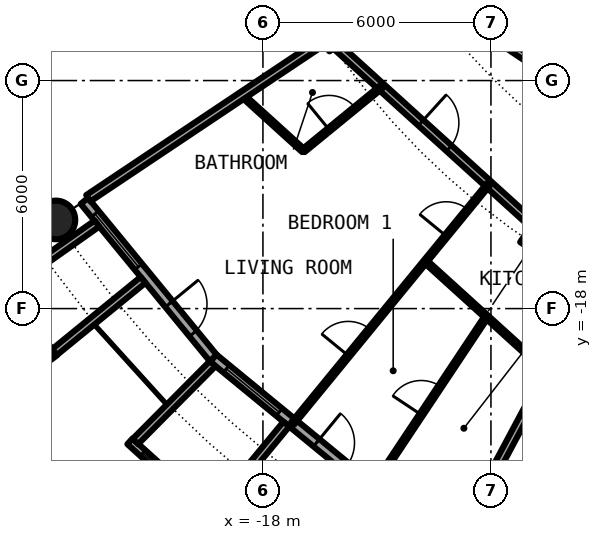
"""IFC4 building model, lengths in metres.
Left out: names, types, materials, properties, quantities, classifications, styles, units other than length and angle.
Written with IfcOpenShell. Run it as: python <this file> out.ifc"""

import sys

from ifc_helpers import new_model, si_unit, direction, frame, frame_2d, origin, origin_2d, place, context, subcontext, project, spatial, rectangle, circle, hollow_circle, i_section, extrude, element, fill, save


model = new_model("IFC4")
c1 = context("Model", 3, precision=1e-05, world=origin(), true_north=direction((0.0, 1.0)))
c2 = subcontext(c1, "Body", "Model", "MODEL_VIEW")
j1 = project(units=[si_unit("LENGTHUNIT", "METRE"), si_unit("PLANEANGLEUNIT", "RADIAN")], contexts=[c1])
p1 = place(None, origin())
s1 = spatial("IfcSite", under=j1, at=p1, CompositionType="ELEMENT")
p2 = place(p1, origin())
s2 = spatial("IfcBuilding", under=s1, at=p2, CompositionType="ELEMENT")
p3 = place(p2, frame((0.0, 0.0, 28.9)))
s3 = spatial("IfcBuildingStorey", under=s2, at=p3, CompositionType="ELEMENT", Elevation=28.9)
p4 = place(p3, frame((-23.448, -15.667, 0.0), z_axis=(0.0, 0.0, 1.0), x_axis=(1.0, 0.0, 0.0)))
e1 = element("IfcColumn", 1, at=p4, inside=s3, PredefinedType="COLUMN", context=c2, shape_type="SweptSolid", body=[
    extrude(hollow_circle(Radius=0.508, WallThickness=0.05, at=origin_2d()), origin(), (0.0, 0.0, 1.0), 3.05),
])
p5 = place(p3, frame((-10.889, -16.297, 0.0), z_axis=(0.0, 0.0, 1.0), x_axis=(-0.55557023302, -0.831469612303, 0.0)))
e2 = element("IfcColumn", 2, at=p5, inside=s3, PredefinedType="COLUMN", context=c2, shape_type="SweptSolid", body=[
    extrude(i_section(OverallWidth=0.305, OverallDepth=0.62, WebThickness=0.021, FlangeThickness=0.04, FilletRadius=0.027, at=origin_2d()), origin(), (0.0, 0.0, 1.0), 3.05),
])
p6 = place(p3, frame((-22.699, -15.167, 0.0), z_axis=(0.0, 0.0, 1.0), x_axis=(0.634382322723, -0.773019449054, 0.0)))
e3 = element("IfcWall", 3, at=p6, inside=s3, PredefinedType="SOLIDWALL", context=c2, shape_type="SweptSolid", body=[
    extrude(rectangle(XDim=5.352, YDim=0.25, at=frame_2d((2.676, 0.0))), origin(), (0.0, 0.0, 1.0), 2.7),
])
p7 = place(p6, frame((0.441, 0.0, 0.3)))
e4 = element("IfcOpeningElement", 4, at=p7, cuts=e3, PredefinedType="OPENING", context=c2, shape_type="SweptSolid", body=[
    extrude(rectangle(XDim=1.8, YDim=2.1, at=frame_2d((0.9, 1.05))), frame((0.0, 0.135, 0.0), z_axis=(0.0, -1.0, 0.0), x_axis=(1.0, 0.0, 0.0)), (0.0, 0.0, 1.0), 0.27),
])
p8 = place(p6, frame((3.51, 0.0, 0.0)))
e5 = element("IfcOpeningElement", 5, at=p8, cuts=e3, PredefinedType="OPENING", context=c2, shape_type="SweptSolid", body=[
    extrude(rectangle(XDim=1.0, YDim=2.2, at=frame_2d((0.5, 1.1))), frame((0.0, 0.135, 0.0), z_axis=(0.0, -1.0, 0.0), x_axis=(1.0, 0.0, 0.0)), (0.0, 0.0, 1.0), 0.27),
])
p9 = place(p3, frame((-24.909, -17.427, -0.03), z_axis=(0.0, 0.0, 1.0), x_axis=(0.60418752353, -0.796842165306, 0.0)))
e6 = element("IfcWall", 6, at=p9, inside=s3, PredefinedType="SOLIDWALL", context=c2, shape_type="SweptSolid", body=[
    extrude(rectangle(XDim=2.337, YDim=0.2, at=frame_2d((1.168, 0.0))), origin(), (0.0, 0.0, 1.0), 2.73),
])
p10 = place(p9, frame((0.128, 0.0, 0.33)))
e7 = element("IfcOpeningElement", 7, at=p10, cuts=e6, PredefinedType="OPENING", context=c2, shape_type="SweptSolid", body=[
    extrude(circle(Radius=1.04, at=frame_2d((1.04, 1.04))), frame((0.0, 0.11, 0.0), z_axis=(0.0, -1.0, 0.0), x_axis=(1.0, 0.0, 0.0)), (0.0, 0.0, 1.0), 0.22),
])
p11 = place(p3, frame((-22.37, -15.765, -0.03), z_axis=(0.0, 0.0, 1.0), x_axis=(-0.817256123454, -0.576274612209, 0.0)))
e8 = element("IfcWall", 8, at=p11, inside=s3, PredefinedType="SOLIDWALL", context=c2, shape_type="SweptSolid", body=[
    extrude(rectangle(XDim=2.933, YDim=0.2, at=frame_2d((1.466, 0.0))), origin(), (0.0, 0.0, 1.0), 2.73),
])
p12 = place(p3, frame((-21.155, -17.246, -0.03), z_axis=(0.0, 0.0, 1.0), x_axis=(-0.775179004516, -0.631741648902, 0.0)))
e9 = element("IfcWall", 9, at=p12, inside=s3, PredefinedType="SOLIDWALL", context=c2, shape_type="SweptSolid", body=[
    extrude(rectangle(XDim=3.006, YDim=0.2, at=frame_2d((1.503, 0.0))), origin(), (0.0, 0.0, 1.0), 2.73),
])
p13 = place(p3, frame((-19.304, -19.304, 0.0), z_axis=(0.0, 0.0, 1.0), x_axis=(0.773019449054, -0.634382322723, 0.0)))
e10 = element("IfcWall", 10, at=p13, inside=s3, PredefinedType="SOLIDWALL", context=c2, shape_type="SweptSolid", body=[
    extrude(rectangle(XDim=5.352, YDim=0.25, at=frame_2d((2.676, 0.0))), origin(), (0.0, 0.0, 1.0), 2.7),
])
p14 = place(p13, frame((0.441, 0.0, 0.3)))
e11 = element("IfcOpeningElement", 11, at=p14, cuts=e10, PredefinedType="OPENING", context=c2, shape_type="SweptSolid", body=[
    extrude(rectangle(XDim=1.8, YDim=2.1, at=frame_2d((0.9, 1.05))), frame((0.0, 0.135, 0.0), z_axis=(0.0, -1.0, 0.0), x_axis=(1.0, 0.0, 0.0)), (0.0, 0.0, 1.0), 0.27),
])
p15 = place(p13, frame((3.51, 0.0, 0.0)))
e12 = element("IfcOpeningElement", 12, at=p15, cuts=e10, PredefinedType="OPENING", context=c2, shape_type="SweptSolid", body=[
    extrude(rectangle(XDim=1.0, YDim=2.2, at=frame_2d((0.5, 1.1))), frame((0.0, 0.135, 0.0), z_axis=(0.0, -1.0, 0.0), x_axis=(1.0, 0.0, 0.0)), (0.0, 0.0, 1.0), 0.27),
])
p16 = place(p3, frame((-21.5, -21.493, -0.03), z_axis=(0.0, 0.0, 1.0), x_axis=(0.740998365753, -0.671506829416, 0.0)))
e13 = element("IfcWall", 13, at=p16, inside=s3, PredefinedType="SOLIDWALL", context=c2, shape_type="SweptSolid", body=[
    extrude(rectangle(XDim=2.993, YDim=0.2, at=frame_2d((1.497, 0.0))), origin(), (0.0, 0.0, 1.0), 2.73),
])
p17 = place(p16, frame((0.457, 0.0, 0.33)))
e14 = element("IfcOpeningElement", 14, at=p17, cuts=e13, PredefinedType="OPENING", context=c2, shape_type="SweptSolid", body=[
    extrude(circle(Radius=1.04, at=frame_2d((1.04, 1.04))), frame((0.0, 0.11, 0.0), z_axis=(0.0, -1.0, 0.0), x_axis=(1.0, 0.0, 0.0)), (0.0, 0.0, 1.0), 0.22),
])
p18 = place(p3, frame((-19.323, -19.45, -0.03), z_axis=(0.0, 0.0, 1.0), x_axis=(-0.704476739375, -0.709727076896, 0.0)))
e15 = element("IfcWall", 15, at=p18, inside=s3, PredefinedType="SOLIDWALL", context=c2, shape_type="SweptSolid", body=[
    extrude(rectangle(XDim=2.883, YDim=0.2, at=frame_2d((1.441, 0.0))), origin(), (0.0, 0.0, 1.0), 2.73),
])
p19 = place(p3, frame((-17.384, -21.041, -0.03), z_axis=(0.0, 0.0, 1.0), x_axis=(-0.63709551667, -0.770784861449, 0.0)))
e16 = element("IfcWall", 16, at=p19, inside=s3, PredefinedType="SOLIDWALL", context=c2, shape_type="SweptSolid", body=[
    extrude(rectangle(XDim=3.006, YDim=0.2, at=frame_2d((1.503, 0.0))), origin(), (0.0, 0.0, 1.0), 2.73),
])
p20 = place(p3, frame((-18.542, -12.389, 0.0), z_axis=(0.0, 0.0, 1.0), x_axis=(0.740836325503, -0.671685595212, 0.0)))
e17 = element("IfcWall", 17, at=p20, inside=s3, PredefinedType="PARTITIONING", context=c2, shape_type="SweptSolid", body=[
    extrude(rectangle(XDim=2.168, YDim=0.1, at=frame_2d((1.084, 0.0))), origin(), (0.0, 0.0, 1.0), 2.7),
])
p21 = place(p3, frame((-13.727, -16.754, 0.0), z_axis=(0.0, 0.0, 1.0), x_axis=(0.740840803797, -0.671680655839, 0.0)))
e18 = element("IfcWall", 18, at=p21, inside=s3, PredefinedType="PARTITIONING", context=c2, shape_type="SweptSolid", body=[
    extrude(rectangle(XDim=4.338, YDim=0.1, at=frame_2d((2.169, 0.0))), origin(), (0.0, 0.0, 1.0), 2.7),
])
p22 = place(p3, frame((-16.18, -10.994, 0.0), z_axis=(0.0, 0.0, 1.0), x_axis=(0.74089212117, -0.671624050186, 0.0)))
e19 = element("IfcWall", 19, at=p22, inside=s3, PredefinedType="PARTITIONING", context=c2, shape_type="SweptSolid", body=[
    extrude(rectangle(XDim=9.368, YDim=0.2, at=frame_2d((4.684, 0.0))), origin(), (0.0, 0.0, 1.0), 2.38),
])
p23 = place(p22, frame((3.153, 0.0, 0.0)))
e20 = element("IfcOpeningElement", 20, at=p23, cuts=e19, PredefinedType="OPENING", context=c2, shape_type="SweptSolid", body=[
    extrude(rectangle(XDim=1.0, YDim=2.3, at=frame_2d((0.5, 1.15))), frame((0.0, 0.11, 0.0), z_axis=(0.0, -1.0, 0.0), x_axis=(1.0, 0.0, 0.0)), (0.0, 0.0, 1.0), 0.22),
])
p24 = place(p3, frame((-14.036, -9.402, 0.0), z_axis=(0.0, 0.0, 1.0), x_axis=(0.831561346449, -0.555432918625, 0.0)))
e21 = element("IfcWall", 21, at=p24, inside=s3, PredefinedType="PARTITIONING", context=c2, shape_type="SweptSolid", body=[
    extrude(rectangle(XDim=12.914, YDim=0.2, at=frame_2d((6.457, 0.0))), origin(), (0.0, 0.0, 1.0), 2.7),
])
p25 = place(p24, frame((7.566, 0.0, 0.0)))
e22 = element("IfcOpeningElement", 22, at=p25, cuts=e21, PredefinedType="OPENING", context=c2, shape_type="SweptSolid", body=[
    extrude(rectangle(XDim=1.0, YDim=2.3, at=frame_2d((0.5, 1.15))), frame((0.0, 0.11, 0.0), z_axis=(0.0, -1.0, 0.0), x_axis=(1.0, 0.0, 0.0)), (0.0, 0.0, 1.0), 0.22),
])
p26 = place(p3, frame((-22.595, -15.097, 0.0), z_axis=(0.0, 0.0, 1.0), x_axis=(0.831465568067, 0.555576285599, 0.0)))
e23 = element("IfcWall", 23, at=p26, inside=s3, PredefinedType="PARTITIONING", context=c2, shape_type="SweptSolid", body=[
    extrude(rectangle(XDim=7.264, YDim=0.2, at=frame_2d((3.632, 0.0))), origin(), (0.0, 0.0, 1.0), 2.7),
])
p27 = place(p3, frame((-17.219, -21.023, 0.0), z_axis=(0.0, 0.0, 1.0), x_axis=(0.633664062855, 0.773608334654, 0.0)))
e24 = element("IfcWall", 24, at=p27, inside=s3, PredefinedType="PARTITIONING", context=c2, shape_type="SweptSolid", body=[
    extrude(rectangle(XDim=8.138, YDim=0.1, at=frame_2d((4.069, 0.0))), origin(), (0.0, 0.0, 1.0), 2.7),
])
p28 = place(p27, frame((6.377, 0.0, 0.0)))
e25 = element("IfcOpeningElement", 25, at=p28, cuts=e24, PredefinedType="OPENING", context=c2, shape_type="SweptSolid", body=[
    extrude(rectangle(XDim=0.9, YDim=2.3, at=frame_2d((0.45, 1.15))), frame((0.0, 0.06, 0.0), z_axis=(0.0, -1.0, 0.0), x_axis=(1.0, 0.0, 0.0)), (0.0, 0.0, 1.0), 0.12),
])
p29 = place(p27, frame((2.308, 0.0, 0.0)))
e26 = element("IfcOpeningElement", 26, at=p29, cuts=e24, PredefinedType="OPENING", context=c2, shape_type="SweptSolid", body=[
    extrude(rectangle(XDim=0.9, YDim=2.3, at=frame_2d((0.45, 1.15))), frame((0.0, 0.06, 0.0), z_axis=(0.0, -1.0, 0.0), x_axis=(1.0, 0.0, 0.0)), (0.0, 0.0, 1.0), 0.12),
])
p30 = place(p3, frame((-16.936, -13.845, 0.0), z_axis=(0.0, 0.0, 1.0), x_axis=(0.774162545943, 0.632986850147, 0.0)))
e27 = element("IfcWall", 27, at=p30, inside=s3, PredefinedType="PARTITIONING", context=c2, shape_type="SweptSolid", body=[
    extrude(rectangle(XDim=2.649, YDim=0.1, at=frame_2d((1.325, 0.0))), origin(), (0.0, 0.0, 1.0), 2.7),
])
p31 = place(p30, frame((0.875, 0.0, 0.0)))
e28 = element("IfcOpeningElement", 28, at=p31, cuts=e27, PredefinedType="OPENING", context=c2, shape_type="SweptSolid", body=[
    extrude(rectangle(XDim=0.9, YDim=2.3, at=frame_2d((0.45, 1.15))), frame((0.0, 0.06, 0.0), z_axis=(0.0, -1.0, 0.0), x_axis=(1.0, 0.0, 0.0)), (0.0, 0.0, 1.0), 0.12),
])
p32 = place(p3, frame((-15.054, -22.624, 0.0), z_axis=(0.0, 0.0, 1.0), x_axis=(0.553913391217, 0.832574294, 0.0)))
e29 = element("IfcWall", 29, at=p32, inside=s3, PredefinedType="PARTITIONING", context=c2, shape_type="SweptSolid", body=[
    extrude(rectangle(XDim=5.301, YDim=0.1, at=frame_2d((2.65, 0.0))), origin(), (0.0, 0.0, 1.0), 2.7),
])
p33 = place(p32, frame((2.2, 0.0, 0.0)))
e30 = element("IfcOpeningElement", 30, at=p33, cuts=e29, PredefinedType="OPENING", context=c2, shape_type="SweptSolid", body=[
    extrude(rectangle(XDim=0.9, YDim=2.3, at=frame_2d((0.45, 1.15))), frame((0.0, 0.06, 0.0), z_axis=(0.0, -1.0, 0.0), x_axis=(1.0, 0.0, 0.0)), (0.0, 0.0, 1.0), 0.12),
])
p34 = place(p3, frame((-12.805, -23.968, 0.0), z_axis=(0.0, 0.0, 1.0), x_axis=(0.471173668908, 0.882040460369, 0.0)))
e31 = element("IfcWall", 31, at=p34, inside=s3, PredefinedType="PARTITIONING", context=c2, shape_type="SweptSolid", body=[
    extrude(rectangle(XDim=7.574, YDim=0.2, at=frame_2d((3.787, 0.0))), origin(), (0.0, 0.0, 1.0), 2.7),
])
p35 = place(p7, origin())
e32 = element("IfcWindow", 32, at=p35, inside=s3, PartitioningType="SINGLE_PANEL", PredefinedType="WINDOW", context=c2, shape_type="SweptSolid", body=[
    extrude(rectangle(XDim=1.8, YDim=2.1, at=frame_2d((0.9, 1.05))), frame((0.0, 0.03, 0.0), z_axis=(0.0, -1.0, 0.0), x_axis=(1.0, 0.0, 0.0)), (0.0, 0.0, 1.0), 0.06),
])
fill(e4, e32)
p36 = place(p8, origin())
e33 = element("IfcDoor", 33, at=p36, inside=s3, OperationType="SINGLE_SWING_LEFT", PredefinedType="DOOR", context=c2, shape_type="SweptSolid", body=[
    extrude(rectangle(XDim=1.0, YDim=2.2, at=frame_2d((0.5, 1.1))), frame((0.0, 0.025, 0.0), z_axis=(0.0, -1.0, 0.0), x_axis=(1.0, 0.0, 0.0)), (0.0, 0.0, 1.0), 0.05),
])
fill(e5, e33)
p37 = place(p14, origin())
e34 = element("IfcWindow", 34, at=p37, inside=s3, PartitioningType="SINGLE_PANEL", PredefinedType="WINDOW", context=c2, shape_type="SweptSolid", body=[
    extrude(rectangle(XDim=1.8, YDim=2.1, at=frame_2d((0.9, 1.05))), frame((0.0, 0.03, 0.0), z_axis=(0.0, -1.0, 0.0), x_axis=(1.0, 0.0, 0.0)), (0.0, 0.0, 1.0), 0.06),
])
fill(e11, e34)
p38 = place(p17, origin())
e35 = element("IfcWindow", 35, at=p38, inside=s3, PartitioningType="SINGLE_PANEL", PredefinedType="WINDOW", context=c2, shape_type="SweptSolid", body=[
    extrude(circle(Radius=1.04, at=frame_2d((1.04, 1.04))), frame((0.0, 0.03, 0.0), z_axis=(0.0, -1.0, 0.0), x_axis=(1.0, 0.0, 0.0)), (0.0, 0.0, 1.0), 0.06),
])
fill(e14, e35)
p39 = place(p15, origin())
e36 = element("IfcDoor", 36, at=p39, inside=s3, OperationType="SINGLE_SWING_LEFT", PredefinedType="DOOR", context=c2, shape_type="SweptSolid", body=[
    extrude(rectangle(XDim=1.0, YDim=2.2, at=frame_2d((0.5, 1.1))), frame((0.0, 0.025, 0.0), z_axis=(0.0, -1.0, 0.0), x_axis=(1.0, 0.0, 0.0)), (0.0, 0.0, 1.0), 0.05),
])
fill(e12, e36)
p40 = place(p23, origin())
e37 = element("IfcDoor", 37, at=p40, inside=s3, OperationType="SINGLE_SWING_LEFT", PredefinedType="DOOR", context=c2, shape_type="SweptSolid", body=[
    extrude(rectangle(XDim=1.0, YDim=2.3, at=frame_2d((0.5, 1.15))), frame((0.0, 0.025, 0.0), z_axis=(0.0, -1.0, 0.0), x_axis=(1.0, 0.0, 0.0)), (0.0, 0.0, 1.0), 0.05),
])
fill(e20, e37)
p41 = place(p31, origin())
e38 = element("IfcDoor", 38, at=p41, inside=s3, OperationType="SINGLE_SWING_LEFT", PredefinedType="DOOR", context=c2, shape_type="SweptSolid", body=[
    extrude(rectangle(XDim=0.9, YDim=2.3, at=frame_2d((0.45, 1.15))), frame((0.0, 0.025, 0.0), z_axis=(0.0, -1.0, 0.0), x_axis=(1.0, 0.0, 0.0)), (0.0, 0.0, 1.0), 0.05),
])
fill(e28, e38)
p42 = place(p28, origin())
e39 = element("IfcDoor", 39, at=p42, inside=s3, OperationType="SINGLE_SWING_RIGHT", PredefinedType="DOOR", context=c2, shape_type="SweptSolid", body=[
    extrude(rectangle(XDim=0.9, YDim=2.3, at=frame_2d((0.45, 1.15))), frame((0.0, 0.025, 0.0), z_axis=(0.0, -1.0, 0.0), x_axis=(1.0, 0.0, 0.0)), (0.0, 0.0, 1.0), 0.05),
])
fill(e25, e39)
p43 = place(p29, origin())
e40 = element("IfcDoor", 40, at=p43, inside=s3, OperationType="SINGLE_SWING_LEFT", PredefinedType="DOOR", context=c2, shape_type="SweptSolid", body=[
    extrude(rectangle(XDim=0.9, YDim=2.3, at=frame_2d((0.45, 1.15))), frame((0.0, 0.025, 0.0), z_axis=(0.0, -1.0, 0.0), x_axis=(1.0, 0.0, 0.0)), (0.0, 0.0, 1.0), 0.05),
])
fill(e26, e40)
p44 = place(p33, origin())
e41 = element("IfcDoor", 41, at=p44, inside=s3, OperationType="SINGLE_SWING_RIGHT", PredefinedType="DOOR", context=c2, shape_type="SweptSolid", body=[
    extrude(rectangle(XDim=0.9, YDim=2.3, at=frame_2d((0.45, 1.15))), frame((0.0, 0.025, 0.0), z_axis=(0.0, -1.0, 0.0), x_axis=(1.0, 0.0, 0.0)), (0.0, 0.0, 1.0), 0.05),
])
fill(e30, e41)
save(model, sys.argv[1])
